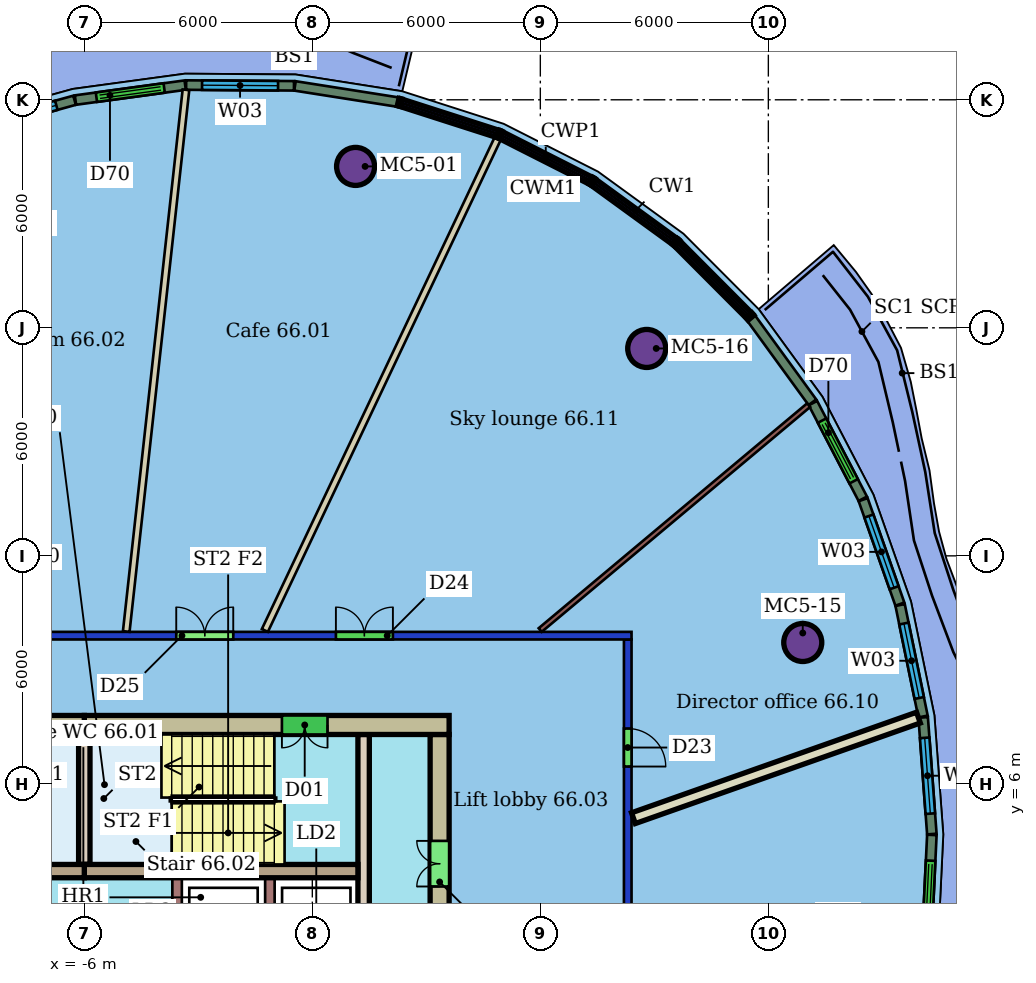
"""IFC4 building model, lengths in metres.
Left out: names, types, materials, properties, quantities, classifications, styles, units other than length and angle.
Written with IfcOpenShell. Run it as: python <this file> out.ifc"""

import sys

from ifc_helpers import new_model, si_unit, direction, frame, frame_2d, origin, origin_2d, place, context, subcontext, project, spatial, rectangle, hollow_circle, extrude, element, fill, save


model = new_model("IFC4")
c1 = context("Model", 3, precision=1e-05, world=origin(), true_north=direction((0.0, 1.0)))
c2 = subcontext(c1, "Body", "Model", "MODEL_VIEW")
j1 = project(units=[si_unit("LENGTHUNIT", "METRE"), si_unit("PLANEANGLEUNIT", "RADIAN")], contexts=[c1])
p1 = place(None, origin())
s1 = spatial("IfcSite", under=j1, at=p1, CompositionType="ELEMENT")
p2 = place(p1, origin())
s2 = spatial("IfcBuilding", under=s1, at=p2, CompositionType="ELEMENT")
p3 = place(p2, frame((0.0, 0.0, 268.5)))
s3 = spatial("IfcBuildingStorey", under=s2, at=p3, CompositionType="ELEMENT", Elevation=268.5)
for number, where, z_axis, x_axis in (
    (1, (1.138, 22.247, 0.0), (0.0, 0.0, 1.0), (1.0, 0.0, 0.0)),
    (2, (12.906, 9.72, 0.0), (0.0, 0.0, 1.0), (1.0, 0.0, 0.0)),
    (3, (8.8, 17.457, 0.0), (0.0, 0.0, 1.0), (1.0, 0.0, 0.0)),
):
    element("IfcColumn", number, at=place(p3, frame(where, z_axis=z_axis, x_axis=x_axis)), inside=s3, PredefinedType="COLUMN", context=c2, shape_type="SweptSolid", body=[
        extrude(hollow_circle(Radius=0.5, WallThickness=0.04, at=origin_2d()), origin(), (0.0, 0.0, 1.0), 3.45),
    ])
p4 = place(p3, frame((-20.4, 9.9, 0.0), z_axis=(0.0, 0.0, 1.0), x_axis=(1.0, 0.0, 0.0)))
e4 = element("IfcWall", 4, at=p4, inside=s3, PredefinedType="PARTITIONING", context=c2, shape_type="SweptSolid", body=[
    extrude(rectangle(XDim=28.8, YDim=0.2, at=frame_2d((14.4, 0.0))), origin(), (0.0, 0.0, 1.0), 3.1),
])
p5 = place(p4, frame((16.82, 0.0, 0.0)))
e5 = element("IfcOpeningElement", 5, at=p5, cuts=e4, PredefinedType="OPENING", context=c2, shape_type="SweptSolid", body=[
    extrude(rectangle(XDim=1.5, YDim=2.4, at=frame_2d((0.75, 1.2))), frame((0.0, 0.11, 0.0), z_axis=(0.0, -1.0, 0.0), x_axis=(1.0, 0.0, 0.0)), (0.0, 0.0, 1.0), 0.22),
])
p6 = place(p4, frame((10.152, 0.0, 0.0)))
e6 = element("IfcOpeningElement", 6, at=p6, cuts=e4, PredefinedType="OPENING", context=c2, shape_type="SweptSolid", body=[
    extrude(rectangle(XDim=1.5, YDim=2.1, at=frame_2d((0.75, 1.05))), frame((0.0, 0.11, 0.0), z_axis=(0.0, -1.0, 0.0), x_axis=(1.0, 0.0, 0.0)), (0.0, 0.0, 1.0), 0.22),
])
p7 = place(p4, frame((21.021, 0.0, 0.0)))
e7 = element("IfcOpeningElement", 7, at=p7, cuts=e4, PredefinedType="OPENING", context=c2, shape_type="SweptSolid", body=[
    extrude(rectangle(XDim=1.5, YDim=2.1, at=frame_2d((0.75, 1.05))), frame((0.0, 0.11, 0.0), z_axis=(0.0, -1.0, 0.0), x_axis=(1.0, 0.0, 0.0)), (0.0, 0.0, 1.0), 0.22),
])
p8 = place(p3, frame((8.3, 9.8, 0.0), z_axis=(0.0, 0.0, 1.0), x_axis=(0.0, -1.0, 0.0)))
e8 = element("IfcWall", 8, at=p8, inside=s3, PredefinedType="PARTITIONING", context=c2, shape_type="SweptSolid", body=[
    extrude(rectangle(XDim=19.6, YDim=0.2, at=frame_2d((9.8, 0.0))), origin(), (0.0, 0.0, 1.0), 3.1),
])
p9 = place(p8, frame((7.671, 0.0, 0.0)))
e9 = element("IfcOpeningElement", 9, at=p9, cuts=e8, PredefinedType="OPENING", context=c2, shape_type="SweptSolid", body=[
    extrude(rectangle(XDim=1.8, YDim=2.4, at=frame_2d((0.9, 1.2))), frame((0.0, 0.11, 0.0), z_axis=(0.0, -1.0, 0.0), x_axis=(1.0, 0.0, 0.0)), (0.0, 0.0, 1.0), 0.22),
])
p10 = place(p8, frame((2.344, 0.0, 0.0)))
e10 = element("IfcOpeningElement", 10, at=p10, cuts=e8, PredefinedType="OPENING", context=c2, shape_type="SweptSolid", body=[
    extrude(rectangle(XDim=1.0, YDim=2.4, at=frame_2d((0.5, 1.2))), frame((0.0, 0.11, 0.0), z_axis=(0.0, -1.0, 0.0), x_axis=(1.0, 0.0, 0.0)), (0.0, 0.0, 1.0), 0.22),
])
p11 = place(p3, frame((4.876, 22.974, 0.0), z_axis=(0.0, 0.0, 1.0), x_axis=(-0.427862697132, -0.903843743356, 0.0)))
e11 = element("IfcWall", 11, at=p11, inside=s3, PredefinedType="PARTITIONING", context=c2, shape_type="SweptSolid", body=[
    extrude(rectangle(XDim=14.313, YDim=0.175, at=frame_2d((7.156, 0.0))), origin(), (0.0, 0.0, 1.0), 3.45),
])
p12 = place(p3, frame((-3.325, 24.263, 0.0), z_axis=(0.0, 0.0, 1.0), x_axis=(-0.109594321607, -0.99397640046, 0.0)))
e12 = element("IfcWall", 12, at=p12, inside=s3, PredefinedType="PARTITIONING", context=c2, shape_type="SweptSolid", body=[
    extrude(rectangle(XDim=14.34, YDim=0.175, at=frame_2d((7.17, 0.0))), origin(), (0.0, 0.0, 1.0), 3.45),
])
p13 = place(p3, frame((15.949, 7.744, 0.0), z_axis=(0.0, 0.0, 1.0), x_axis=(-0.943031701319, -0.332702885933, 0.0)))
e13 = element("IfcWall", 13, at=p13, inside=s3, PredefinedType="PARTITIONING", context=c2, shape_type="SweptSolid", body=[
    extrude(rectangle(XDim=7.952, YDim=0.3, at=frame_2d((3.976, 0.0))), origin(), (0.0, 0.0, 1.0), 3.45),
])
p14 = place(p3, frame((13.061, 15.965, 0.0), z_axis=(0.0, 0.0, 1.0), x_axis=(-0.766607537876, -0.642115941923, 0.0)))
e14 = element("IfcWall", 14, at=p14, inside=s3, PredefinedType="PARTITIONING", context=c2, shape_type="SweptSolid", body=[
    extrude(rectangle(XDim=9.215, YDim=0.125, at=frame_2d((4.608, 0.0))), origin(), (0.0, 0.0, 1.0), 3.45),
])
p15 = place(p3, frame((2.244, 23.941, 0.0), z_axis=(0.0, 0.0, 1.0), x_axis=(-0.987863424028, 0.155324999492, 0.0)))
e15 = element("IfcWall", 15, at=p15, inside=s3, PredefinedType="SOLIDWALL", context=c2, shape_type="SweptSolid", body=[
    extrude(rectangle(XDim=2.733, YDim=0.25, at=frame_2d((1.367, 0.0))), origin(), (0.0, 0.0, 1.0), 3.15),
])
p16 = place(p3, frame((-0.482, 24.368, 0.0), z_axis=(0.0, 0.0, 1.0), x_axis=(-0.999975721993, 0.006968172185, 0.0)))
e16 = element("IfcWall", 16, at=p16, inside=s3, PredefinedType="SOLIDWALL", context=c2, shape_type="SweptSolid", body=[
    extrude(rectangle(XDim=2.838, YDim=0.25, at=frame_2d((1.419, 0.0))), origin(), (0.0, 0.0, 1.0), 3.15),
])
p17 = place(p16, frame((0.419, 0.0, 0.9)))
e17 = element("IfcOpeningElement", 17, at=p17, cuts=e16, PredefinedType="OPENING", context=c2, shape_type="SweptSolid", body=[
    extrude(rectangle(XDim=2.0, YDim=2.1, at=frame_2d((1.0, 1.05))), frame((0.0, 0.135, 0.0), z_axis=(0.0, -1.0, 0.0), x_axis=(1.0, 0.0, 0.0)), (0.0, 0.0, 1.0), 0.27),
])
p18 = place(p3, frame((-3.346, 24.386, 0.0), z_axis=(0.0, 0.0, 1.0), x_axis=(-0.990855140329, -0.134929948061, 0.0)))
e18 = element("IfcWall", 18, at=p18, inside=s3, PredefinedType="SOLIDWALL", context=c2, shape_type="SweptSolid", body=[
    extrude(rectangle(XDim=2.913, YDim=0.25, at=frame_2d((1.457, 0.0))), origin(), (0.0, 0.0, 1.0), 3.15),
])
p19 = place(p18, frame((0.557, 0.0, 0.0)))
e19 = element("IfcOpeningElement", 19, at=p19, cuts=e18, PredefinedType="OPENING", context=c2, shape_type="SweptSolid", body=[
    extrude(rectangle(XDim=1.8, YDim=2.4, at=frame_2d((0.9, 1.2))), frame((0.0, 0.135, 0.0), z_axis=(0.0, -1.0, 0.0), x_axis=(1.0, 0.0, 0.0)), (0.0, 0.0, 1.0), 0.27),
])
p20 = place(p3, frame((-6.257, 23.988, 0.0), z_axis=(0.0, 0.0, 1.0), x_axis=(-0.963614779494, -0.267294887231, 0.0)))
e20 = element("IfcWall", 20, at=p20, inside=s3, PredefinedType="SOLIDWALL", context=c2, shape_type="SweptSolid", body=[
    extrude(rectangle(XDim=2.995, YDim=0.25, at=frame_2d((1.498, 0.0))), origin(), (0.0, 0.0, 1.0), 3.15),
])
p21 = place(p20, frame((0.498, 0.0, 0.9)))
e21 = element("IfcOpeningElement", 21, at=p21, cuts=e20, PredefinedType="OPENING", context=c2, shape_type="SweptSolid", body=[
    extrude(rectangle(XDim=2.0, YDim=2.1, at=frame_2d((1.0, 1.05))), frame((0.0, 0.135, 0.0), z_axis=(0.0, -1.0, 0.0), x_axis=(1.0, 0.0, 0.0)), (0.0, 0.0, 1.0), 0.27),
])
p22 = place(p3, frame((16.152, 1.506, 0.0), z_axis=(0.0, 0.0, 1.0), x_axis=(0.047748991173, 0.998859366398, 0.0)))
e22 = element("IfcWall", 22, at=p22, inside=s3, PredefinedType="SOLIDWALL", context=c2, shape_type="SweptSolid", body=[
    extrude(rectangle(XDim=3.155, YDim=0.25, at=frame_2d((1.577, 0.0))), origin(), (0.0, 0.0, 1.0), 3.15),
])
p23 = place(p22, frame((0.677, 0.0, 0.0)))
e23 = element("IfcOpeningElement", 23, at=p23, cuts=e22, PredefinedType="OPENING", context=c2, shape_type="SweptSolid", body=[
    extrude(rectangle(XDim=1.8, YDim=2.4, at=frame_2d((0.9, 1.2))), frame((0.0, 0.135, 0.0), z_axis=(0.0, -1.0, 0.0), x_axis=(1.0, 0.0, 0.0)), (0.0, 0.0, 1.0), 0.27),
])
p24 = place(p3, frame((16.302, 4.68, 0.0), z_axis=(0.0, 0.0, 1.0), x_axis=(-0.074336319404, 0.997233228296, 0.0)))
e24 = element("IfcWall", 24, at=p24, inside=s3, PredefinedType="SOLIDWALL", context=c2, shape_type="SweptSolid", body=[
    extrude(rectangle(XDim=3.077, YDim=0.25, at=frame_2d((1.539, 0.0))), origin(), (0.0, 0.0, 1.0), 3.15),
])
p25 = place(p24, frame((0.539, 0.0, 0.9)))
e25 = element("IfcOpeningElement", 25, at=p25, cuts=e24, PredefinedType="OPENING", context=c2, shape_type="SweptSolid", body=[
    extrude(rectangle(XDim=2.0, YDim=2.1, at=frame_2d((1.0, 1.05))), frame((0.0, 0.135, 0.0), z_axis=(0.0, -1.0, 0.0), x_axis=(1.0, 0.0, 0.0)), (0.0, 0.0, 1.0), 0.27),
])
p26 = place(p3, frame((16.071, 7.773, 0.0), z_axis=(0.0, 0.0, 1.0), x_axis=(-0.201427510103, 0.979503424279, 0.0)))
e26 = element("IfcWall", 26, at=p26, inside=s3, PredefinedType="SOLIDWALL", context=c2, shape_type="SweptSolid", body=[
    extrude(rectangle(XDim=2.995, YDim=0.25, at=frame_2d((1.498, 0.0))), origin(), (0.0, 0.0, 1.0), 3.15),
])
p27 = place(p26, frame((0.498, 0.0, 0.9)))
e27 = element("IfcOpeningElement", 27, at=p27, cuts=e26, PredefinedType="OPENING", context=c2, shape_type="SweptSolid", body=[
    extrude(rectangle(XDim=2.0, YDim=2.1, at=frame_2d((1.0, 1.05))), frame((0.0, 0.135, 0.0), z_axis=(0.0, -1.0, 0.0), x_axis=(1.0, 0.0, 0.0)), (0.0, 0.0, 1.0), 0.27),
])
p28 = place(p3, frame((15.461, 10.73, 0.0), z_axis=(0.0, 0.0, 1.0), x_axis=(-0.331522283712, 0.943447388784, 0.0)))
e28 = element("IfcWall", 28, at=p28, inside=s3, PredefinedType="SOLIDWALL", context=c2, shape_type="SweptSolid", body=[
    extrude(rectangle(XDim=2.913, YDim=0.25, at=frame_2d((1.457, 0.0))), origin(), (0.0, 0.0, 1.0), 3.15),
])
p29 = place(p28, frame((0.457, 0.0, 0.9)))
e29 = element("IfcOpeningElement", 29, at=p29, cuts=e28, PredefinedType="OPENING", context=c2, shape_type="SweptSolid", body=[
    extrude(rectangle(XDim=2.0, YDim=2.1, at=frame_2d((1.0, 1.05))), frame((0.0, 0.135, 0.0), z_axis=(0.0, -1.0, 0.0), x_axis=(1.0, 0.0, 0.0)), (0.0, 0.0, 1.0), 0.27),
])
p30 = place(p3, frame((14.485, 13.502, 0.0), z_axis=(0.0, 0.0, 1.0), x_axis=(-0.462051428088, 0.886853132036, 0.0)))
e30 = element("IfcWall", 30, at=p30, inside=s3, PredefinedType="SOLIDWALL", context=c2, shape_type="SweptSolid", body=[
    extrude(rectangle(XDim=2.838, YDim=0.25, at=frame_2d((1.419, 0.0))), origin(), (0.0, 0.0, 1.0), 3.15),
])
p31 = place(p30, frame((0.519, 0.0, 0.0)))
e31 = element("IfcOpeningElement", 31, at=p31, cuts=e30, PredefinedType="OPENING", context=c2, shape_type="SweptSolid", body=[
    extrude(rectangle(XDim=1.8, YDim=2.4, at=frame_2d((0.9, 1.2))), frame((0.0, 0.135, 0.0), z_axis=(0.0, -1.0, 0.0), x_axis=(1.0, 0.0, 0.0)), (0.0, 0.0, 1.0), 0.27),
])
p32 = place(p3, frame((13.159, 16.042, 0.0), z_axis=(0.0, 0.0, 1.0), x_axis=(-0.588607099097, 0.808419249457, 0.0)))
e32 = element("IfcWall", 32, at=p32, inside=s3, PredefinedType="SOLIDWALL", context=c2, shape_type="SweptSolid", body=[
    extrude(rectangle(XDim=2.733, YDim=0.25, at=frame_2d((1.367, 0.0))), origin(), (0.0, 0.0, 1.0), 3.15),
])
p33 = place(p3, frame((3.6, 7.55, 0.0), z_axis=(0.0, 0.0, 1.0), x_axis=(-1.0, 0.0, 0.0)))
e33 = element("IfcWall", 33, at=p33, inside=s3, PredefinedType="SHEAR", context=c2, shape_type="SweptSolid", body=[
    extrude(rectangle(XDim=9.6, YDim=0.5, at=frame_2d((4.8, 0.0))), origin(), (0.0, 0.0, 1.0), 3.3),
])
p34 = place(p33, frame((3.2, 0.0, 0.0)))
e34 = element("IfcOpeningElement", 34, at=p34, cuts=e33, PredefinedType="OPENING", context=c2, shape_type="SweptSolid", body=[
    extrude(rectangle(XDim=1.2, YDim=2.1, at=frame_2d((0.6, 1.05))), frame((0.0, 0.26, 0.0), z_axis=(0.0, -1.0, 0.0), x_axis=(1.0, 0.0, 0.0)), (0.0, 0.0, 1.0), 0.52),
])
p35 = place(p3, frame((-6.0, 7.55, 0.0), z_axis=(0.0, 0.0, 1.0), x_axis=(-1.0, 0.0, 0.0)))
e35 = element("IfcWall", 35, at=p35, inside=s3, PredefinedType="SHEAR", context=c2, shape_type="SweptSolid", body=[
    extrude(rectangle(XDim=9.6, YDim=0.5, at=frame_2d((4.8, 0.0))), origin(), (0.0, 0.0, 1.0), 3.3),
])
p36 = place(p35, frame((5.2, 0.0, 0.0)))
e36 = element("IfcOpeningElement", 36, at=p36, cuts=e35, PredefinedType="OPENING", context=c2, shape_type="SweptSolid", body=[
    extrude(rectangle(XDim=1.2, YDim=2.1, at=frame_2d((0.6, 1.05))), frame((0.0, 0.26, 0.0), z_axis=(0.0, -1.0, 0.0), x_axis=(1.0, 0.0, 0.0)), (0.0, 0.0, 1.0), 0.52),
])
p37 = place(p3, frame((3.35, -7.3, 0.0), z_axis=(0.0, 0.0, 1.0), x_axis=(0.0, 1.0, 0.0)))
e37 = element("IfcWall", 37, at=p37, inside=s3, PredefinedType="SHEAR", context=c2, shape_type="SweptSolid", body=[
    extrude(rectangle(XDim=14.6, YDim=0.5, at=frame_2d((7.3, 0.0))), origin(), (0.0, 0.0, 1.0), 3.3),
])
p38 = place(p37, frame((2.8, 0.0, 0.0)))
e38 = element("IfcOpeningElement", 38, at=p38, cuts=e37, PredefinedType="OPENING", context=c2, shape_type="SweptSolid", body=[
    extrude(rectangle(XDim=1.2, YDim=2.1, at=frame_2d((0.6, 1.05))), frame((0.0, 0.26, 0.0), z_axis=(0.0, -1.0, 0.0), x_axis=(1.0, 0.0, 0.0)), (0.0, 0.0, 1.0), 0.52),
])
p39 = place(p37, frame((10.6, 0.0, 0.0)))
e39 = element("IfcOpeningElement", 39, at=p39, cuts=e37, PredefinedType="OPENING", context=c2, shape_type="SweptSolid", body=[
    extrude(rectangle(XDim=1.2, YDim=2.1, at=frame_2d((0.6, 1.05))), frame((0.0, 0.26, 0.0), z_axis=(0.0, -1.0, 0.0), x_axis=(1.0, 0.0, 0.0)), (0.0, 0.0, 1.0), 0.52),
])
for number, where, z_axis, x_axis in (
    (40, (-13.2, 3.705, 0.0), (0.0, 0.0, 1.0), (1.0, 0.0, 0.0)),
    (41, (-6.0, 3.705, 0.0), (0.0, 0.0, 1.0), (1.0, 0.0, 0.0)),
):
    element("IfcWall", number, at=place(p3, frame(where, z_axis=z_axis, x_axis=x_axis)), inside=s3, PredefinedType="SHEAR", context=c2, shape_type="SweptSolid", body=[
        extrude(rectangle(XDim=7.2, YDim=0.35, at=frame_2d((3.6, 0.0))), origin(), (0.0, 0.0, 1.0), 3.3),
    ])
p40 = place(p3, frame((1.35, -7.3, 0.0), z_axis=(0.0, 0.0, 1.0), x_axis=(0.0, 1.0, 0.0)))
e42 = element("IfcWall", 42, at=p40, inside=s3, PredefinedType="SHEAR", context=c2, shape_type="SweptSolid", body=[
    extrude(rectangle(XDim=14.6, YDim=0.3, at=frame_2d((7.3, 0.0))), origin(), (0.0, 0.0, 1.0), 3.3),
])
p41 = place(p40, frame((1.21, 0.0, 0.0)))
e43 = element("IfcOpeningElement", 43, at=p41, cuts=e42, PredefinedType="OPENING", context=c2, shape_type="SweptSolid", body=[
    extrude(rectangle(XDim=1.0, YDim=2.1, at=frame_2d((0.5, 1.05))), frame((0.0, 0.16, 0.0), z_axis=(0.0, -1.0, 0.0), x_axis=(1.0, 0.0, 0.0)), (0.0, 0.0, 1.0), 0.32),
])
p42 = place(p40, frame((6.55, 0.0, 0.0)))
e44 = element("IfcOpeningElement", 44, at=p42, cuts=e42, PredefinedType="OPENING", context=c2, shape_type="SweptSolid", body=[
    extrude(rectangle(XDim=1.5, YDim=2.1, at=frame_2d((0.75, 1.05))), frame((0.0, 0.16, 0.0), z_axis=(0.0, -1.0, 0.0), x_axis=(1.0, 0.0, 0.0)), (0.0, 0.0, 1.0), 0.32),
])
p43 = place(p3, frame((-6.0, 3.88, 0.0), z_axis=(0.0, 0.0, 1.0), x_axis=(0.0, 1.0, 0.0)))
e45 = element("IfcWall", 45, at=p43, inside=s3, PredefinedType="SHEAR", context=c2, shape_type="SweptSolid", body=[
    extrude(rectangle(XDim=3.42, YDim=0.3, at=frame_2d((1.71, 0.0))), origin(), (0.0, 0.0, 1.0), 3.3),
])
for number, where, z_axis, x_axis in (
    (46, (-3.558, 1.6, 0.0), (0.0, 0.0, 1.0), (0.0, 1.0, 0.0)),
    (47, (-1.117, 1.6, 0.0), (0.0, 0.0, 1.0), (0.0, 1.0, 0.0)),
):
    element("IfcWall", number, at=place(p3, frame(where, z_axis=z_axis, x_axis=x_axis)), inside=s3, PredefinedType="SHEAR", context=c2, shape_type="SweptSolid", body=[
        extrude(rectangle(XDim=1.93, YDim=0.25, at=frame_2d((0.965, 0.0))), origin(), (0.0, 0.0, 1.0), 3.3),
    ])
p44 = place(p5, origin())
e48 = element("IfcDoor", 48, at=p44, inside=s3, OperationType="DOUBLE_DOOR_SINGLE_SWING", PredefinedType="DOOR", context=c2, shape_type="SweptSolid", body=[
    extrude(rectangle(XDim=1.5, YDim=2.4, at=frame_2d((0.75, 1.2))), frame((0.0, 0.025, 0.0), z_axis=(0.0, -1.0, 0.0), x_axis=(1.0, 0.0, 0.0)), (0.0, 0.0, 1.0), 0.05),
])
fill(e5, e48)
p45 = place(p10, origin())
e49 = element("IfcDoor", 49, at=p45, inside=s3, OperationType="SINGLE_SWING_RIGHT", PredefinedType="DOOR", context=c2, shape_type="SweptSolid", body=[
    extrude(rectangle(XDim=1.0, YDim=2.4, at=frame_2d((0.5, 1.2))), frame((0.0, 0.025, 0.0), z_axis=(0.0, -1.0, 0.0), x_axis=(1.0, 0.0, 0.0)), (0.0, 0.0, 1.0), 0.05),
])
fill(e10, e49)
p46 = place(p7, origin())
e50 = element("IfcDoor", 50, at=p46, inside=s3, OperationType="DOUBLE_DOOR_SINGLE_SWING", PredefinedType="DOOR", context=c2, shape_type="SweptSolid", body=[
    extrude(rectangle(XDim=1.5, YDim=2.1, at=frame_2d((0.75, 1.05))), frame((0.0, 0.025, 0.0), z_axis=(0.0, -1.0, 0.0), x_axis=(1.0, 0.0, 0.0)), (0.0, 0.0, 1.0), 0.05),
])
fill(e7, e50)
p47 = place(p17, origin())
e51 = element("IfcWindow", 51, at=p47, inside=s3, PartitioningType="SINGLE_PANEL", PredefinedType="WINDOW", context=c2, shape_type="SweptSolid", body=[
    extrude(rectangle(XDim=2.0, YDim=2.1, at=frame_2d((1.0, 1.05))), frame((0.0, 0.03, 0.0), z_axis=(0.0, -1.0, 0.0), x_axis=(1.0, 0.0, 0.0)), (0.0, 0.0, 1.0), 0.06),
])
fill(e17, e51)
p48 = place(p19, origin())
e52 = element("IfcDoor", 52, at=p48, inside=s3, OperationType="DOUBLE_DOOR_SLIDING", PredefinedType="DOOR", context=c2, shape_type="SweptSolid", body=[
    extrude(rectangle(XDim=1.8, YDim=2.4, at=frame_2d((0.9, 1.2))), frame((0.0, 0.025, 0.0), z_axis=(0.0, -1.0, 0.0), x_axis=(1.0, 0.0, 0.0)), (0.0, 0.0, 1.0), 0.05),
])
fill(e19, e52)
p49 = place(p21, origin())
e53 = element("IfcWindow", 53, at=p49, inside=s3, PartitioningType="SINGLE_PANEL", PredefinedType="WINDOW", context=c2, shape_type="SweptSolid", body=[
    extrude(rectangle(XDim=2.0, YDim=2.1, at=frame_2d((1.0, 1.05))), frame((0.0, 0.03, 0.0), z_axis=(0.0, -1.0, 0.0), x_axis=(1.0, 0.0, 0.0)), (0.0, 0.0, 1.0), 0.06),
])
fill(e21, e53)
p50 = place(p23, origin())
e54 = element("IfcDoor", 54, at=p50, inside=s3, OperationType="DOUBLE_DOOR_SLIDING", PredefinedType="DOOR", context=c2, shape_type="SweptSolid", body=[
    extrude(rectangle(XDim=1.8, YDim=2.4, at=frame_2d((0.9, 1.2))), frame((0.0, 0.025, 0.0), z_axis=(0.0, -1.0, 0.0), x_axis=(1.0, 0.0, 0.0)), (0.0, 0.0, 1.0), 0.05),
])
fill(e23, e54)
p51 = place(p25, origin())
e55 = element("IfcWindow", 55, at=p51, inside=s3, PartitioningType="SINGLE_PANEL", PredefinedType="WINDOW", context=c2, shape_type="SweptSolid", body=[
    extrude(rectangle(XDim=2.0, YDim=2.1, at=frame_2d((1.0, 1.05))), frame((0.0, 0.03, 0.0), z_axis=(0.0, -1.0, 0.0), x_axis=(1.0, 0.0, 0.0)), (0.0, 0.0, 1.0), 0.06),
])
fill(e25, e55)
p52 = place(p27, origin())
e56 = element("IfcWindow", 56, at=p52, inside=s3, PartitioningType="SINGLE_PANEL", PredefinedType="WINDOW", context=c2, shape_type="SweptSolid", body=[
    extrude(rectangle(XDim=2.0, YDim=2.1, at=frame_2d((1.0, 1.05))), frame((0.0, 0.03, 0.0), z_axis=(0.0, -1.0, 0.0), x_axis=(1.0, 0.0, 0.0)), (0.0, 0.0, 1.0), 0.06),
])
fill(e27, e56)
p53 = place(p29, origin())
e57 = element("IfcWindow", 57, at=p53, inside=s3, PartitioningType="SINGLE_PANEL", PredefinedType="WINDOW", context=c2, shape_type="SweptSolid", body=[
    extrude(rectangle(XDim=2.0, YDim=2.1, at=frame_2d((1.0, 1.05))), frame((0.0, 0.03, 0.0), z_axis=(0.0, -1.0, 0.0), x_axis=(1.0, 0.0, 0.0)), (0.0, 0.0, 1.0), 0.06),
])
fill(e29, e57)
p54 = place(p31, origin())
e58 = element("IfcDoor", 58, at=p54, inside=s3, OperationType="DOUBLE_DOOR_SLIDING", PredefinedType="DOOR", context=c2, shape_type="SweptSolid", body=[
    extrude(rectangle(XDim=1.8, YDim=2.4, at=frame_2d((0.9, 1.2))), frame((0.0, 0.025, 0.0), z_axis=(0.0, -1.0, 0.0), x_axis=(1.0, 0.0, 0.0)), (0.0, 0.0, 1.0), 0.05),
])
fill(e31, e58)
p55 = place(p34, origin())
e59 = element("IfcDoor", 59, at=p55, inside=s3, OperationType="DOUBLE_DOOR_SINGLE_SWING", PredefinedType="NOTDEFINED", context=c2, shape_type="SweptSolid", body=[
    extrude(rectangle(XDim=1.2, YDim=2.1, at=frame_2d((0.6, 1.05))), frame((0.0, 0.025, 0.0), z_axis=(0.0, -1.0, 0.0), x_axis=(1.0, 0.0, 0.0)), (0.0, 0.0, 1.0), 0.05),
])
fill(e34, e59)
p56 = place(p39, origin())
e60 = element("IfcDoor", 60, at=p56, inside=s3, OperationType="DOUBLE_DOOR_SINGLE_SWING", PredefinedType="NOTDEFINED", context=c2, shape_type="SweptSolid", body=[
    extrude(rectangle(XDim=1.2, YDim=2.1, at=frame_2d((0.6, 1.05))), frame((0.0, 0.025, 0.0), z_axis=(0.0, -1.0, 0.0), x_axis=(1.0, 0.0, 0.0)), (0.0, 0.0, 1.0), 0.05),
])
fill(e39, e60)
save(model, sys.argv[1])
